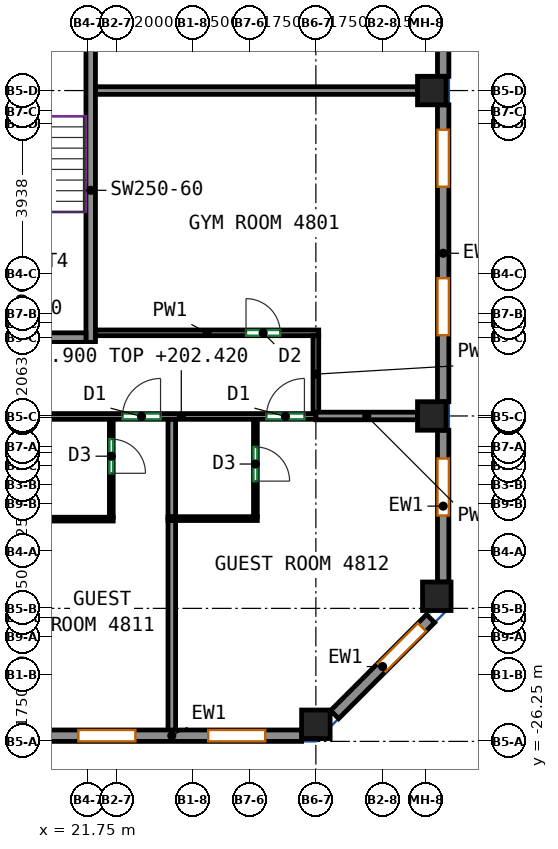
"""IFC4 building model, lengths in metres.
Left out: names, types, materials, properties, quantities, classifications, styles, units other than length and angle.
Written with IfcOpenShell. Run it as: python <this file> out.ifc"""

import sys

from ifc_helpers import new_model, si_unit, direction, frame, frame_2d, origin, origin_2d, place, context, subcontext, project, spatial, rectangle, extrude, source, transform, mapped, element, fill, save


model = new_model("IFC4")
c1 = context("Model", 3, precision=1e-05, world=origin(), true_north=direction((0.0, 1.0)))
c2 = subcontext(c1, "Body", "Model", "MODEL_VIEW")
j1 = project(units=[si_unit("LENGTHUNIT", "METRE"), si_unit("PLANEANGLEUNIT", "RADIAN")], contexts=[c1])
p1 = place(None, origin())
s1 = spatial("IfcSite", under=j1, at=p1, CompositionType="ELEMENT")
p2 = place(p1, origin())
s2 = spatial("IfcBuilding", under=s1, at=p2, CompositionType="ELEMENT")
p3 = place(p2, frame((0.0, 0.0, 199.9)))
s3 = spatial("IfcBuildingStorey", under=s2, at=p3, CompositionType="ELEMENT", Elevation=199.9)
m1 = source(origin(), c2, "Body", "SweptSolid", [
    extrude(rectangle(XDim=0.75, YDim=0.75, at=origin_2d()), origin(), (0.0, 0.0, 1.0), 3.12),
])
for number, where, z_axis, x_axis in (
    (1, (27.75, -25.8, 0.0), (0.0, 0.0, 1.0), (1.0, 0.0, 0.0)),
    (2, (30.8, -17.688, 0.0), (0.0, 0.0, 1.0), (1.0, 0.0, 0.0)),
    (3, (30.8, -9.125, 0.0), (0.0, 0.0, 1.0), (1.0, 0.0, 0.0)),
    (4, (30.932, -22.432, 0.0), (0.0, 0.0, 1.0), (1.0, 0.0, 0.0)),
):
    element("IfcColumn", number, at=place(p3, frame(where, z_axis=z_axis, x_axis=x_axis)), inside=s3, PredefinedType="COLUMN", context=c2, shape_type="MappedRepresentation", body=[
        mapped(m1, transform((0.0, 0.0, 0.0))),
    ])
m2 = source(origin(), c2, "Body", "SweptSolid", [
    extrude(rectangle(XDim=8.0, YDim=0.25, at=frame_2d((4.0, 0.0))), origin(), (0.0, 0.0, 1.0), 3.12),
])
p4 = place(p3, frame((21.825, -15.75, 0.0), z_axis=(0.0, 0.0, 1.0), x_axis=(0.0, 1.0, 0.0)))
e5 = element("IfcWall", 5, at=p4, inside=s3, PredefinedType="SHEAR", context=c2, shape_type="MappedRepresentation", body=[
    mapped(m2, transform((0.0, 0.0, 0.0))),
])
m3 = source(origin(), c2, "Body", "SweptSolid", [
    extrude(rectangle(XDim=3.7, YDim=0.25, at=frame_2d((1.85, 0.0))), origin(), (0.0, 0.0, 1.0), 3.12),
])
p5 = place(p3, frame((18.0, -15.625, 0.0), z_axis=(0.0, 0.0, 1.0), x_axis=(1.0, 0.0, 0.0)))
e6 = element("IfcWall", 6, at=p5, inside=s3, PredefinedType="SHEAR", context=c2, shape_type="MappedRepresentation", body=[
    mapped(m3, transform((0.0, 0.0, 0.0))),
])
m4 = source(origin(), c2, "Body", "SweptSolid", [
    extrude(rectangle(XDim=6.833, YDim=0.3, at=frame_2d((3.417, 0.0))), origin(), (0.0, 0.0, 1.0), 3.12),
])
p6 = place(p3, frame((20.542, -26.1, 0.0), z_axis=(0.0, 0.0, 1.0), x_axis=(1.0, 0.0, 0.0)))
e7 = element("IfcWall", 7, at=p6, inside=s3, PredefinedType="SOLIDWALL", context=c2, shape_type="MappedRepresentation", body=[
    mapped(m4, transform((0.0, 0.0, 0.0))),
])
p7 = place(p6, frame((0.958, 0.0, 0.85)))
e8 = element("IfcOpeningElement", 8, at=p7, cuts=e7, PredefinedType="OPENING", context=c2, shape_type="SweptSolid", body=[
    extrude(rectangle(XDim=1.5, YDim=1.95, at=frame_2d((0.75, 0.975))), frame((0.0, 0.16, 0.0), z_axis=(0.0, -1.0, 0.0), x_axis=(1.0, 0.0, 0.0)), (0.0, 0.0, 1.0), 0.32),
])
p8 = place(p6, frame((4.375, 0.0, 0.85)))
e9 = element("IfcOpeningElement", 9, at=p8, cuts=e7, PredefinedType="OPENING", context=c2, shape_type="SweptSolid", body=[
    extrude(rectangle(XDim=1.5, YDim=1.95, at=frame_2d((0.75, 0.975))), frame((0.0, 0.16, 0.0), z_axis=(0.0, -1.0, 0.0), x_axis=(1.0, 0.0, 0.0)), (0.0, 0.0, 1.0), 0.32),
])
m5 = source(origin(), c2, "Body", "SweptSolid", [
    extrude(rectangle(XDim=3.571, YDim=0.3, at=frame_2d((1.786, 0.0))), origin(), (0.0, 0.0, 1.0), 3.12),
])
p9 = place(p3, frame((28.244, -25.544, 0.0), z_axis=(0.0, 0.0, 1.0), x_axis=(0.707072595841, 0.707140964879, 0.0)))
e10 = element("IfcWall", 10, at=p9, inside=s3, PredefinedType="SOLIDWALL", context=c2, shape_type="MappedRepresentation", body=[
    mapped(m5, transform((0.0, 0.0, 0.0))),
])
p10 = place(p9, frame((1.75, 0.0, 0.85)))
e11 = element("IfcOpeningElement", 11, at=p10, cuts=e10, PredefinedType="OPENING", context=c2, shape_type="SweptSolid", body=[
    extrude(rectangle(XDim=1.5, YDim=1.95, at=frame_2d((0.75, 0.975))), frame((0.0, 0.16, 0.0), z_axis=(0.0, -1.0, 0.0), x_axis=(1.0, 0.0, 0.0)), (0.0, 0.0, 1.0), 0.32),
])
m6 = source(origin(), c2, "Body", "SweptSolid", [
    extrude(rectangle(XDim=3.994, YDim=0.3, at=frame_2d((1.997, 0.0))), origin(), (0.0, 0.0, 1.0), 3.12),
])
p11 = place(p3, frame((31.1, -22.057, 0.0), z_axis=(0.0, 0.0, 1.0), x_axis=(0.0, 1.0, 0.0)))
e12 = element("IfcWall", 12, at=p11, inside=s3, PredefinedType="SOLIDWALL", context=c2, shape_type="MappedRepresentation", body=[
    mapped(m6, transform((0.0, 0.0, 0.0))),
])
p12 = place(p11, frame((1.75, 0.0, 0.85)))
e13 = element("IfcOpeningElement", 13, at=p12, cuts=e12, PredefinedType="OPENING", context=c2, shape_type="SweptSolid", body=[
    extrude(rectangle(XDim=1.5, YDim=1.95, at=frame_2d((0.75, 0.975))), frame((0.0, 0.16, 0.0), z_axis=(0.0, -1.0, 0.0), x_axis=(1.0, 0.0, 0.0)), (0.0, 0.0, 1.0), 0.32),
])
m7 = source(origin(), c2, "Body", "SweptSolid", [
    extrude(rectangle(XDim=7.812, YDim=0.3, at=frame_2d((3.906, 0.0))), origin(), (0.0, 0.0, 1.0), 3.12),
])
p13 = place(p3, frame((31.1, -17.312, 0.0), z_axis=(0.0, 0.0, 1.0), x_axis=(0.0, 1.0, 0.0)))
e14 = element("IfcWall", 14, at=p13, inside=s3, PredefinedType="SOLIDWALL", context=c2, shape_type="MappedRepresentation", body=[
    mapped(m7, transform((0.0, 0.0, 0.0))),
])
p14 = place(p13, frame((1.75, 0.0, 0.85)))
e15 = element("IfcOpeningElement", 15, at=p14, cuts=e14, PredefinedType="OPENING", context=c2, shape_type="SweptSolid", body=[
    extrude(rectangle(XDim=1.5, YDim=1.95, at=frame_2d((0.75, 0.975))), frame((0.0, 0.16, 0.0), z_axis=(0.0, -1.0, 0.0), x_axis=(1.0, 0.0, 0.0)), (0.0, 0.0, 1.0), 0.32),
])
p15 = place(p13, frame((5.656, 0.0, 0.85)))
e16 = element("IfcOpeningElement", 16, at=p15, cuts=e14, PredefinedType="OPENING", context=c2, shape_type="SweptSolid", body=[
    extrude(rectangle(XDim=1.5, YDim=1.95, at=frame_2d((0.75, 0.975))), frame((0.0, 0.16, 0.0), z_axis=(0.0, -1.0, 0.0), x_axis=(1.0, 0.0, 0.0)), (0.0, 0.0, 1.0), 0.32),
])
p16 = place(p3, frame((31.1, -8.75, 0.0), z_axis=(0.0, 0.0, 1.0), x_axis=(0.0, 1.0, 0.0)))
e17 = element("IfcWall", 17, at=p16, inside=s3, PredefinedType="SOLIDWALL", context=c2, shape_type="MappedRepresentation", body=[
    mapped(m7, transform((0.0, 0.0, 0.0))),
])
p17 = place(p16, frame((1.75, 0.0, 0.85)))
e18 = element("IfcOpeningElement", 18, at=p17, cuts=e17, PredefinedType="OPENING", context=c2, shape_type="SweptSolid", body=[
    extrude(rectangle(XDim=1.5, YDim=1.95, at=frame_2d((0.75, 0.975))), frame((0.0, 0.16, 0.0), z_axis=(0.0, -1.0, 0.0), x_axis=(1.0, 0.0, 0.0)), (0.0, 0.0, 1.0), 0.32),
])
p18 = place(p16, frame((5.656, 0.0, 0.85)))
e19 = element("IfcOpeningElement", 19, at=p18, cuts=e17, PredefinedType="OPENING", context=c2, shape_type="SweptSolid", body=[
    extrude(rectangle(XDim=1.5, YDim=1.95, at=frame_2d((0.75, 0.975))), frame((0.0, 0.16, 0.0), z_axis=(0.0, -1.0, 0.0), x_axis=(1.0, 0.0, 0.0)), (0.0, 0.0, 1.0), 0.32),
])
p19 = place(p3, frame((20.667, -17.7, 0.0), z_axis=(0.0, 0.0, 1.0), x_axis=(1.0, 0.0, 0.0)))
e20 = element("IfcWall", 20, at=p19, inside=s3, PredefinedType="PARTITIONING", context=c2, shape_type="SweptSolid", body=[
    extrude(rectangle(XDim=7.083, YDim=0.15, at=frame_2d((3.542, 0.0))), origin(), (0.0, 0.0, 1.0), 2.52),
])
p20 = place(p19, frame((1.996, 0.0, 0.0)))
e21 = element("IfcOpeningElement", 21, at=p20, cuts=e20, PredefinedType="OPENING", context=c2, shape_type="SweptSolid", body=[
    extrude(rectangle(XDim=1.0, YDim=2.1, at=frame_2d((0.5, 1.05))), frame((0.0, 0.085, 0.0), z_axis=(0.0, -1.0, 0.0), x_axis=(1.0, 0.0, 0.0)), (0.0, 0.0, 1.0), 0.17),
])
p21 = place(p19, frame((5.782, 0.0, 0.0)))
e22 = element("IfcOpeningElement", 22, at=p21, cuts=e20, PredefinedType="OPENING", context=c2, shape_type="SweptSolid", body=[
    extrude(rectangle(XDim=1.0, YDim=2.1, at=frame_2d((0.5, 1.05))), frame((0.0, 0.085, 0.0), z_axis=(0.0, -1.0, 0.0), x_axis=(1.0, 0.0, 0.0)), (0.0, 0.0, 1.0), 0.17),
])
p22 = place(p3, frame((21.95, -15.5, 0.0), z_axis=(0.0, 0.0, 1.0), x_axis=(1.0, 0.0, 0.0)))
e23 = element("IfcWall", 23, at=p22, inside=s3, PredefinedType="PARTITIONING", context=c2, shape_type="SweptSolid", body=[
    extrude(rectangle(XDim=5.875, YDim=0.15, at=frame_2d((2.938, 0.0))), origin(), (0.0, 0.0, 1.0), 3.12),
])
p23 = place(p22, frame((3.962, 0.0, 0.0)))
e24 = element("IfcOpeningElement", 24, at=p23, cuts=e23, PredefinedType="OPENING", context=c2, shape_type="SweptSolid", body=[
    extrude(rectangle(XDim=0.9, YDim=2.1, at=frame_2d((0.45, 1.05))), frame((0.0, 0.085, 0.0), z_axis=(0.0, -1.0, 0.0), x_axis=(1.0, 0.0, 0.0)), (0.0, 0.0, 1.0), 0.17),
])
p24 = place(p3, frame((27.75, -17.598, 0.0), z_axis=(0.0, 0.0, 1.0), x_axis=(0.0, 1.0, 0.0)))
e25 = element("IfcWall", 25, at=p24, inside=s3, PredefinedType="PARTITIONING", context=c2, shape_type="SweptSolid", body=[
    extrude(rectangle(XDim=2.023, YDim=0.15, at=frame_2d((1.011, 0.0))), origin(), (0.0, 0.0, 1.0), 2.52),
])
p25 = place(p3, frame((17.917, -20.402, 0.0), z_axis=(0.0, 0.0, 1.0), x_axis=(1.0, 0.0, 0.0)))
e26 = element("IfcWall", 26, at=p25, inside=s3, PredefinedType="PARTITIONING", context=c2, shape_type="SweptSolid", body=[
    extrude(rectangle(XDim=4.5, YDim=0.1, at=frame_2d((2.25, 0.0))), origin(), (0.0, 0.0, 1.0), 3.12),
])
p26 = place(p3, frame((22.367, -17.777, 0.0), z_axis=(0.0, 0.0, 1.0), x_axis=(0.0, -1.0, 0.0)))
e27 = element("IfcWall", 27, at=p26, inside=s3, PredefinedType="PARTITIONING", context=c2, shape_type="SweptSolid", body=[
    extrude(rectangle(XDim=2.575, YDim=0.1, at=frame_2d((1.288, 0.0))), origin(), (0.0, 0.0, 1.0), 3.12),
])
p27 = place(p26, frame((0.519, 0.0, 0.0)))
e28 = element("IfcOpeningElement", 28, at=p27, cuts=e27, PredefinedType="OPENING", context=c2, shape_type="SweptSolid", body=[
    extrude(rectangle(XDim=0.9, YDim=2.1, at=frame_2d((0.45, 1.05))), frame((0.0, 0.06, 0.0), z_axis=(0.0, -1.0, 0.0), x_axis=(1.0, 0.0, 0.0)), (0.0, 0.0, 1.0), 0.12),
])
p28 = place(p3, frame((23.959, -26.0, 0.0), z_axis=(0.0, 0.0, 1.0), x_axis=(0.0, 1.0, 0.0)))
e29 = element("IfcWall", 29, at=p28, inside=s3, PredefinedType="PARTITIONING", context=c2, shape_type="SweptSolid", body=[
    extrude(rectangle(XDim=5.572, YDim=0.2, at=frame_2d((2.786, 0.0))), origin(), (0.0, 0.0, 1.0), 3.12),
])
p29 = place(p3, frame((23.959, -20.348, 0.0), z_axis=(0.0, 0.0, 1.0), x_axis=(0.0, 1.0, 0.0)))
e30 = element("IfcWall", 30, at=p29, inside=s3, PredefinedType="PARTITIONING", context=c2, shape_type="SweptSolid", body=[
    extrude(rectangle(XDim=2.571, YDim=0.2, at=frame_2d((1.285, 0.0))), origin(), (0.0, 0.0, 1.0), 3.12),
])
p30 = place(p3, frame((23.859, -20.388, 0.0), z_axis=(0.0, 0.0, 1.0), x_axis=(1.0, 0.0, 0.0)))
e31 = element("IfcWall", 31, at=p30, inside=s3, PredefinedType="PARTITIONING", context=c2, shape_type="SweptSolid", body=[
    extrude(rectangle(XDim=2.35, YDim=0.1, at=frame_2d((1.175, 0.0))), origin(), (0.0, 0.0, 1.0), 3.12),
])
p31 = place(p3, frame((26.159, -17.777, 0.0), z_axis=(0.0, 0.0, 1.0), x_axis=(0.0, -1.0, 0.0)))
e32 = element("IfcWall", 32, at=p31, inside=s3, PredefinedType="PARTITIONING", context=c2, shape_type="SweptSolid", body=[
    extrude(rectangle(XDim=2.561, YDim=0.1, at=frame_2d((1.28, 0.0))), origin(), (0.0, 0.0, 1.0), 3.12),
])
p32 = place(p31, frame((0.725, 0.0, 0.0)))
e33 = element("IfcOpeningElement", 33, at=p32, cuts=e32, PredefinedType="OPENING", context=c2, shape_type="SweptSolid", body=[
    extrude(rectangle(XDim=0.9, YDim=2.1, at=frame_2d((0.45, 1.05))), frame((0.0, 0.06, 0.0), z_axis=(0.0, -1.0, 0.0), x_axis=(1.0, 0.0, 0.0)), (0.0, 0.0, 1.0), 0.12),
])
p33 = place(p3, frame((27.752, -17.688, 0.0), z_axis=(0.0, 0.0, 1.0), x_axis=(1.0, 0.0, 0.0)))
e34 = element("IfcWall", 34, at=p33, inside=s3, PredefinedType="PARTITIONING", context=c2, shape_type="SweptSolid", body=[
    extrude(rectangle(XDim=2.673, YDim=0.2, at=frame_2d((1.336, 0.0))), origin(), (0.0, 0.0, 1.0), 2.52),
])
p34 = place(p3, frame((21.95, -9.125, 0.0), z_axis=(0.0, 0.0, 1.0), x_axis=(1.0, 0.0, 0.0)))
e35 = element("IfcWall", 35, at=p34, inside=s3, PredefinedType="PARTITIONING", context=c2, shape_type="SweptSolid", body=[
    extrude(rectangle(XDim=8.475, YDim=0.2, at=frame_2d((4.238, 0.0))), origin(), (0.0, 0.0, 1.0), 3.12),
])
p35 = place(p7, origin())
e36 = element("IfcWindow", 36, at=p35, inside=s3, PartitioningType="SINGLE_PANEL", PredefinedType="WINDOW", context=c2, shape_type="SweptSolid", body=[
    extrude(rectangle(XDim=1.5, YDim=1.95, at=frame_2d((0.75, 0.975))), frame((0.0, 0.03, 0.0), z_axis=(0.0, -1.0, 0.0), x_axis=(1.0, 0.0, 0.0)), (0.0, 0.0, 1.0), 0.06),
])
fill(e8, e36)
p36 = place(p8, origin())
e37 = element("IfcWindow", 37, at=p36, inside=s3, PartitioningType="SINGLE_PANEL", PredefinedType="WINDOW", context=c2, shape_type="SweptSolid", body=[
    extrude(rectangle(XDim=1.5, YDim=1.95, at=frame_2d((0.75, 0.975))), frame((0.0, 0.03, 0.0), z_axis=(0.0, -1.0, 0.0), x_axis=(1.0, 0.0, 0.0)), (0.0, 0.0, 1.0), 0.06),
])
fill(e9, e37)
p37 = place(p10, origin())
e38 = element("IfcWindow", 38, at=p37, inside=s3, PartitioningType="SINGLE_PANEL", PredefinedType="WINDOW", context=c2, shape_type="SweptSolid", body=[
    extrude(rectangle(XDim=1.5, YDim=1.95, at=frame_2d((0.75, 0.975))), frame((0.0, 0.03, 0.0), z_axis=(0.0, -1.0, 0.0), x_axis=(1.0, 0.0, 0.0)), (0.0, 0.0, 1.0), 0.06),
])
fill(e11, e38)
p38 = place(p12, origin())
e39 = element("IfcWindow", 39, at=p38, inside=s3, PartitioningType="SINGLE_PANEL", PredefinedType="WINDOW", context=c2, shape_type="SweptSolid", body=[
    extrude(rectangle(XDim=1.5, YDim=1.95, at=frame_2d((0.75, 0.975))), frame((0.0, 0.03, 0.0), z_axis=(0.0, -1.0, 0.0), x_axis=(1.0, 0.0, 0.0)), (0.0, 0.0, 1.0), 0.06),
])
fill(e13, e39)
p39 = place(p14, origin())
e40 = element("IfcWindow", 40, at=p39, inside=s3, PartitioningType="SINGLE_PANEL", PredefinedType="WINDOW", context=c2, shape_type="SweptSolid", body=[
    extrude(rectangle(XDim=1.5, YDim=1.95, at=frame_2d((0.75, 0.975))), frame((0.0, 0.03, 0.0), z_axis=(0.0, -1.0, 0.0), x_axis=(1.0, 0.0, 0.0)), (0.0, 0.0, 1.0), 0.06),
])
fill(e15, e40)
p40 = place(p15, origin())
e41 = element("IfcWindow", 41, at=p40, inside=s3, PartitioningType="SINGLE_PANEL", PredefinedType="WINDOW", context=c2, shape_type="SweptSolid", body=[
    extrude(rectangle(XDim=1.5, YDim=1.95, at=frame_2d((0.75, 0.975))), frame((0.0, 0.03, 0.0), z_axis=(0.0, -1.0, 0.0), x_axis=(1.0, 0.0, 0.0)), (0.0, 0.0, 1.0), 0.06),
])
fill(e16, e41)
p41 = place(p32, origin())
e42 = element("IfcDoor", 42, at=p41, inside=s3, OperationType="SINGLE_SWING_RIGHT", PredefinedType="DOOR", context=c2, shape_type="SweptSolid", body=[
    extrude(rectangle(XDim=0.9, YDim=2.1, at=frame_2d((0.45, 1.05))), frame((0.0, 0.025, 0.0), z_axis=(0.0, -1.0, 0.0), x_axis=(1.0, 0.0, 0.0)), (0.0, 0.0, 1.0), 0.05),
])
fill(e33, e42)
p42 = place(p27, origin())
e43 = element("IfcDoor", 43, at=p42, inside=s3, OperationType="SINGLE_SWING_RIGHT", PredefinedType="DOOR", context=c2, shape_type="SweptSolid", body=[
    extrude(rectangle(XDim=0.9, YDim=2.1, at=frame_2d((0.45, 1.05))), frame((0.0, 0.025, 0.0), z_axis=(0.0, -1.0, 0.0), x_axis=(1.0, 0.0, 0.0)), (0.0, 0.0, 1.0), 0.05),
])
fill(e28, e43)
p43 = place(p20, origin())
e44 = element("IfcDoor", 44, at=p43, inside=s3, OperationType="SINGLE_SWING_RIGHT", PredefinedType="DOOR", context=c2, shape_type="SweptSolid", body=[
    extrude(rectangle(XDim=1.0, YDim=2.1, at=frame_2d((0.5, 1.05))), frame((0.0, 0.025, 0.0), z_axis=(0.0, -1.0, 0.0), x_axis=(1.0, 0.0, 0.0)), (0.0, 0.0, 1.0), 0.05),
])
fill(e21, e44)
p44 = place(p21, origin())
e45 = element("IfcDoor", 45, at=p44, inside=s3, OperationType="SINGLE_SWING_RIGHT", PredefinedType="DOOR", context=c2, shape_type="SweptSolid", body=[
    extrude(rectangle(XDim=1.0, YDim=2.1, at=frame_2d((0.5, 1.05))), frame((0.0, 0.025, 0.0), z_axis=(0.0, -1.0, 0.0), x_axis=(1.0, 0.0, 0.0)), (0.0, 0.0, 1.0), 0.05),
])
fill(e22, e45)
p45 = place(p23, origin())
e46 = element("IfcDoor", 46, at=p45, inside=s3, OperationType="SINGLE_SWING_LEFT", PredefinedType="DOOR", context=c2, shape_type="SweptSolid", body=[
    extrude(rectangle(XDim=0.9, YDim=2.1, at=frame_2d((0.45, 1.05))), frame((0.0, 0.025, 0.0), z_axis=(0.0, -1.0, 0.0), x_axis=(1.0, 0.0, 0.0)), (0.0, 0.0, 1.0), 0.05),
])
fill(e24, e46)
save(model, sys.argv[1])
